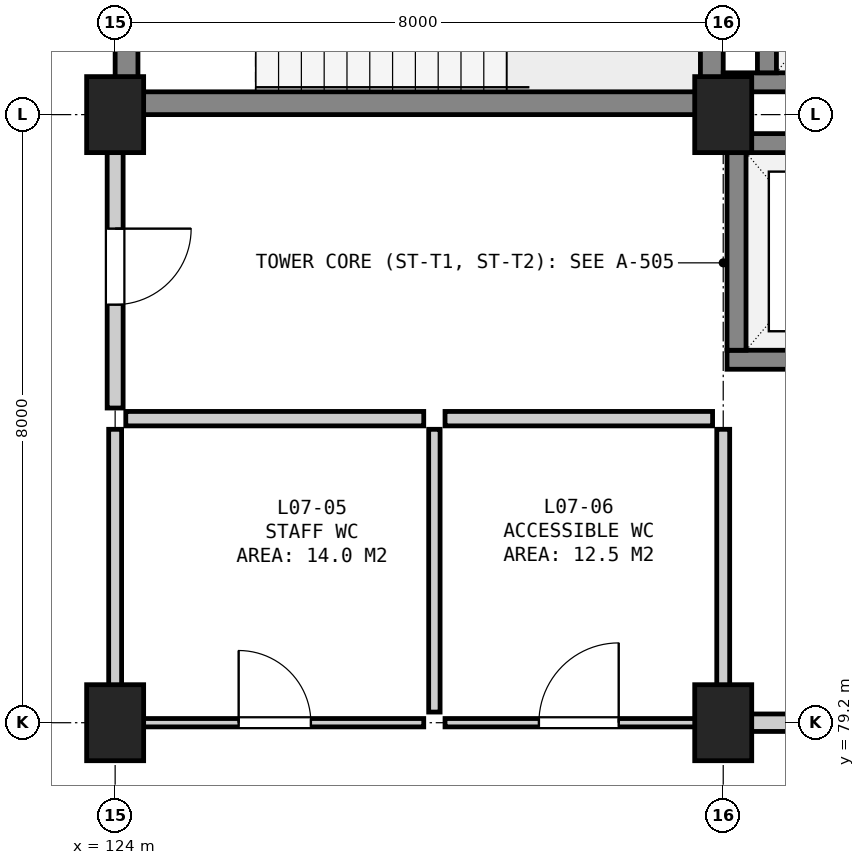
"""IFC4 building model, lengths in metres.
Left out: names, types, materials, properties, quantities, classifications, styles, units other than length and angle.
Written with IfcOpenShell. Run it as: python <this file> out.ifc"""

import sys

from ifc_helpers import new_model, si_unit, direction, frame, frame_2d, origin, origin_2d, place, context, subcontext, project, spatial, rectangle, extrude, element, fill, save


model = new_model("IFC4")
c1 = context("Model", 3, precision=1e-05, world=origin(), true_north=direction((0.0, 1.0)))
c2 = subcontext(c1, "Body", "Model", "MODEL_VIEW")
j1 = project(units=[si_unit("LENGTHUNIT", "METRE"), si_unit("PLANEANGLEUNIT", "RADIAN")], contexts=[c1])
p1 = place(None, origin())
s1 = spatial("IfcSite", under=j1, at=p1, CompositionType="ELEMENT")
p2 = place(p1, origin())
s2 = spatial("IfcBuilding", under=s1, at=p2, CompositionType="ELEMENT")
p3 = place(p2, frame((0.0, 0.0, 31.7)))
s3 = spatial("IfcBuildingStorey", under=s2, at=p3, CompositionType="ELEMENT", Elevation=31.7)
for number, where, z_axis, x_axis in (
    (1, (124.0, 79.2, 0.0), (0.0, 0.0, 1.0), (1.0, 0.0, 0.0)),
    (2, (124.0, 87.2, 0.0), (0.0, 0.0, 1.0), (1.0, 0.0, 0.0)),
    (3, (132.0, 79.2, 0.0), (0.0, 0.0, 1.0), (1.0, 0.0, 0.0)),
    (4, (132.0, 87.2, 0.0), (0.0, 0.0, 1.0), (1.0, 0.0, 0.0)),
):
    element("IfcColumn", number, at=place(p3, frame(where, z_axis=z_axis, x_axis=x_axis)), inside=s3, PredefinedType="COLUMN", context=c2, shape_type="SweptSolid", body=[
        extrude(rectangle(XDim=0.75, YDim=1.0, at=origin_2d()), origin(), (0.0, 0.0, 1.0), 3.9),
    ])
for number, where, z_axis, x_axis in (
    (5, (124.15, 87.2, 0.0), (0.0, 0.0, 1.0), (0.0, 1.0, 0.0)),
    (6, (131.85, 87.2, 0.0), (0.0, 0.0, 1.0), (0.0, 1.0, 0.0)),
):
    element("IfcWall", number, at=place(p3, frame(where, z_axis=z_axis, x_axis=x_axis)), inside=s3, PredefinedType="SHEAR", context=c2, shape_type="SweptSolid", body=[
        extrude(rectangle(XDim=4.2, YDim=0.3, at=frame_2d((2.1, 0.0))), origin(), (0.0, 0.0, 1.0), 3.62),
    ])
p4 = place(p3, frame((124.3, 87.35, 0.0), z_axis=(0.0, 0.0, 1.0), x_axis=(1.0, 0.0, 0.0)))
e7 = element("IfcWall", 7, at=p4, inside=s3, PredefinedType="SHEAR", context=c2, shape_type="SweptSolid", body=[
    extrude(rectangle(XDim=7.4, YDim=0.3, at=frame_2d((3.7, 0.0))), origin(), (0.0, 0.0, 1.0), 3.62),
])
p5 = place(p3, frame((132.0, 87.625, 0.0), z_axis=(0.0, 0.0, 1.0), x_axis=(1.0, 0.0, 0.0)))
e8 = element("IfcWall", 8, at=p5, inside=s3, PredefinedType="SHEAR", context=c2, shape_type="SweptSolid", body=[
    extrude(rectangle(XDim=3.15, YDim=0.25, at=frame_2d((1.575, 0.0))), origin(), (0.0, 0.0, 1.0), 3.62),
])
p6 = place(p3, frame((132.575, 87.75, 0.0), z_axis=(0.0, 0.0, 1.0), x_axis=(0.0, 1.0, 0.0)))
e9 = element("IfcWall", 9, at=p6, inside=s3, PredefinedType="SHEAR", context=c2, shape_type="SweptSolid", body=[
    extrude(rectangle(XDim=2.9, YDim=0.25, at=frame_2d((1.45, 0.0))), origin(), (0.0, 0.0, 1.0), 3.62),
])
p7 = place(p3, frame((132.05, 83.975, 0.0), z_axis=(0.0, 0.0, 1.0), x_axis=(1.0, 0.0, 0.0)))
e10 = element("IfcWall", 10, at=p7, inside=s3, PredefinedType="SHEAR", context=c2, shape_type="SweptSolid", body=[
    extrude(rectangle(XDim=2.7, YDim=0.25, at=frame_2d((1.35, 0.0))), origin(), (0.0, 0.0, 1.0), 3.62),
])
p8 = place(p7, frame((0.8, 0.0, 0.0)))
e11 = element("IfcOpeningElement", 11, at=p8, cuts=e10, PredefinedType="OPENING", context=c2, shape_type="SweptSolid", body=[
    extrude(rectangle(XDim=1.1, YDim=2.15, at=frame_2d((0.55, 1.075))), frame((0.0, 0.137, 0.0), z_axis=(0.0, -1.0, 0.0), x_axis=(1.0, 0.0, 0.0)), (0.0, 0.0, 1.0), 0.274),
])
p9 = place(p3, frame((132.05, 86.825, 0.0), z_axis=(0.0, 0.0, 1.0), x_axis=(1.0, 0.0, 0.0)))
e12 = element("IfcWall", 12, at=p9, inside=s3, PredefinedType="SHEAR", context=c2, shape_type="SweptSolid", body=[
    extrude(rectangle(XDim=2.7, YDim=0.25, at=frame_2d((1.35, 0.0))), origin(), (0.0, 0.0, 1.0), 3.62),
])
p10 = place(p3, frame((132.175, 84.1, 0.0), z_axis=(0.0, 0.0, 1.0), x_axis=(0.0, 1.0, 0.0)))
e13 = element("IfcWall", 13, at=p10, inside=s3, PredefinedType="SHEAR", context=c2, shape_type="SweptSolid", body=[
    extrude(rectangle(XDim=2.6, YDim=0.25, at=frame_2d((1.3, 0.0))), origin(), (0.0, 0.0, 1.0), 3.62),
])
p11 = place(p3, frame((124.14, 79.2, 0.0), z_axis=(0.0, 0.0, 1.0), x_axis=(1.0, 0.0, 0.0)))
e14 = element("IfcWall", 14, at=p11, inside=s3, PredefinedType="PARTITIONING", context=c2, shape_type="SweptSolid", body=[
    extrude(rectangle(XDim=3.92, YDim=0.11, at=frame_2d((1.96, 0.0))), origin(), (0.0, 0.0, 1.0), 3.085),
])
p12 = place(p11, frame((1.485, 0.0, 0.0)))
e15 = element("IfcOpeningElement", 15, at=p12, cuts=e14, PredefinedType="OPENING", context=c2, shape_type="SweptSolid", body=[
    extrude(rectangle(XDim=0.95, YDim=2.15, at=frame_2d((0.475, 1.075))), frame((0.0, 0.067, 0.0), z_axis=(0.0, -1.0, 0.0), x_axis=(1.0, 0.0, 0.0)), (0.0, 0.0, 1.0), 0.134),
])
p13 = place(p3, frame((124.14, 83.2, 0.0), z_axis=(0.0, 0.0, 1.0), x_axis=(1.0, 0.0, 0.0)))
e16 = element("IfcWall", 16, at=p13, inside=s3, PredefinedType="PARTITIONING", context=c2, shape_type="SweptSolid", body=[
    extrude(rectangle(XDim=3.92, YDim=0.19, at=frame_2d((1.96, 0.0))), origin(), (0.0, 0.0, 1.0), 3.62),
])
p14 = place(p3, frame((124.0, 79.34, 0.0), z_axis=(0.0, 0.0, 1.0), x_axis=(0.0, 1.0, 0.0)))
e17 = element("IfcWall", 17, at=p14, inside=s3, PredefinedType="PARTITIONING", context=c2, shape_type="SweptSolid", body=[
    extrude(rectangle(XDim=3.72, YDim=0.17, at=frame_2d((1.86, 0.0))), origin(), (0.0, 0.0, 1.0), 3.135),
])
p15 = place(p3, frame((128.2, 79.34, 0.0), z_axis=(0.0, 0.0, 1.0), x_axis=(0.0, 1.0, 0.0)))
e18 = element("IfcWall", 18, at=p15, inside=s3, PredefinedType="PARTITIONING", context=c2, shape_type="SweptSolid", body=[
    extrude(rectangle(XDim=3.72, YDim=0.15, at=frame_2d((1.86, 0.0))), origin(), (0.0, 0.0, 1.0), 3.62),
])
p16 = place(p3, frame((128.34, 79.2, 0.0), z_axis=(0.0, 0.0, 1.0), x_axis=(1.0, 0.0, 0.0)))
e19 = element("IfcWall", 19, at=p16, inside=s3, PredefinedType="PARTITIONING", context=c2, shape_type="SweptSolid", body=[
    extrude(rectangle(XDim=3.52, YDim=0.11, at=frame_2d((1.76, 0.0))), origin(), (0.0, 0.0, 1.0), 3.085),
])
p17 = place(p16, frame((1.235, 0.0, 0.0)))
e20 = element("IfcOpeningElement", 20, at=p17, cuts=e19, PredefinedType="OPENING", context=c2, shape_type="SweptSolid", body=[
    extrude(rectangle(XDim=1.05, YDim=2.15, at=frame_2d((0.525, 1.075))), frame((0.0, 0.067, 0.0), z_axis=(0.0, -1.0, 0.0), x_axis=(1.0, 0.0, 0.0)), (0.0, 0.0, 1.0), 0.134),
])
p18 = place(p3, frame((128.34, 83.2, 0.0), z_axis=(0.0, 0.0, 1.0), x_axis=(1.0, 0.0, 0.0)))
e21 = element("IfcWall", 21, at=p18, inside=s3, PredefinedType="PARTITIONING", context=c2, shape_type="SweptSolid", body=[
    extrude(rectangle(XDim=3.52, YDim=0.19, at=frame_2d((1.76, 0.0))), origin(), (0.0, 0.0, 1.0), 3.62),
])
p19 = place(p3, frame((132.0, 79.34, 0.0), z_axis=(0.0, 0.0, 1.0), x_axis=(0.0, 1.0, 0.0)))
e22 = element("IfcWall", 22, at=p19, inside=s3, PredefinedType="PARTITIONING", context=c2, shape_type="SweptSolid", body=[
    extrude(rectangle(XDim=3.72, YDim=0.17, at=frame_2d((1.86, 0.0))), origin(), (0.0, 0.0, 1.0), 2.985),
])
p20 = place(p3, frame((124.0, 83.34, 0.0), z_axis=(0.0, 0.0, 1.0), x_axis=(0.0, 1.0, 0.0)))
e23 = element("IfcWall", 23, at=p20, inside=s3, PredefinedType="SOLIDWALL", context=c2, shape_type="SweptSolid", body=[
    extrude(rectangle(XDim=3.72, YDim=0.21, at=frame_2d((1.86, 0.0))), origin(), (0.0, 0.0, 1.0), 3.135),
])
p21 = place(p20, frame((1.36, 0.0, 0.0)))
e24 = element("IfcOpeningElement", 24, at=p21, cuts=e23, PredefinedType="OPENING", context=c2, shape_type="SweptSolid", body=[
    extrude(rectangle(XDim=1.0, YDim=2.15, at=frame_2d((0.5, 1.075))), frame((0.0, 0.117, 0.0), z_axis=(0.0, -1.0, 0.0), x_axis=(1.0, 0.0, 0.0)), (0.0, 0.0, 1.0), 0.234),
])
p22 = place(p3, frame((132.14, 79.2, 0.0), z_axis=(0.0, 0.0, 1.0), x_axis=(1.0, 0.0, 0.0)))
e25 = element("IfcWall", 25, at=p22, inside=s3, PredefinedType="SOLIDWALL", context=c2, shape_type="SweptSolid", body=[
    extrude(rectangle(XDim=7.72, YDim=0.23, at=frame_2d((3.86, 0.0))), origin(), (0.0, 0.0, 1.0), 3.135),
])
p23 = place(p22, frame((3.11, 0.0, 0.0)))
e26 = element("IfcOpeningElement", 26, at=p23, cuts=e25, PredefinedType="OPENING", context=c2, shape_type="SweptSolid", body=[
    extrude(rectangle(XDim=1.5, YDim=2.2, at=frame_2d((0.75, 1.1))), frame((0.0, 0.127, 0.0), z_axis=(0.0, -1.0, 0.0), x_axis=(1.0, 0.0, 0.0)), (0.0, 0.0, 1.0), 0.254),
])
p24 = place(p12, origin())
e27 = element("IfcDoor", 27, at=p24, inside=s3, OperationType="SINGLE_SWING_LEFT", PredefinedType="DOOR", context=c2, shape_type="SweptSolid", body=[
    extrude(rectangle(XDim=0.95, YDim=2.15, at=frame_2d((0.475, 1.075))), frame((0.0, 0.025, 0.0), z_axis=(0.0, -1.0, 0.0), x_axis=(1.0, 0.0, 0.0)), (0.0, 0.0, 1.0), 0.05),
])
fill(e15, e27)
p25 = place(p17, origin())
e28 = element("IfcDoor", 28, at=p25, inside=s3, OperationType="SINGLE_SWING_RIGHT", PredefinedType="DOOR", context=c2, shape_type="SweptSolid", body=[
    extrude(rectangle(XDim=1.05, YDim=2.15, at=frame_2d((0.525, 1.075))), frame((0.0, 0.025, 0.0), z_axis=(0.0, -1.0, 0.0), x_axis=(1.0, 0.0, 0.0)), (0.0, 0.0, 1.0), 0.05),
])
fill(e20, e28)
p26 = place(p21, frame((1.0, 0.0, 0.0), z_axis=(0.0, 0.0, 1.0), x_axis=(-1.0, 0.0, 0.0)))
e29 = element("IfcDoor", 29, at=p26, inside=s3, OperationType="SINGLE_SWING_LEFT", PredefinedType="DOOR", context=c2, shape_type="SweptSolid", body=[
    extrude(rectangle(XDim=1.0, YDim=2.15, at=frame_2d((0.5, 1.075))), frame((0.0, 0.025, 0.0), z_axis=(0.0, -1.0, 0.0), x_axis=(1.0, 0.0, 0.0)), (0.0, 0.0, 1.0), 0.05),
])
fill(e24, e29)
save(model, sys.argv[1])
